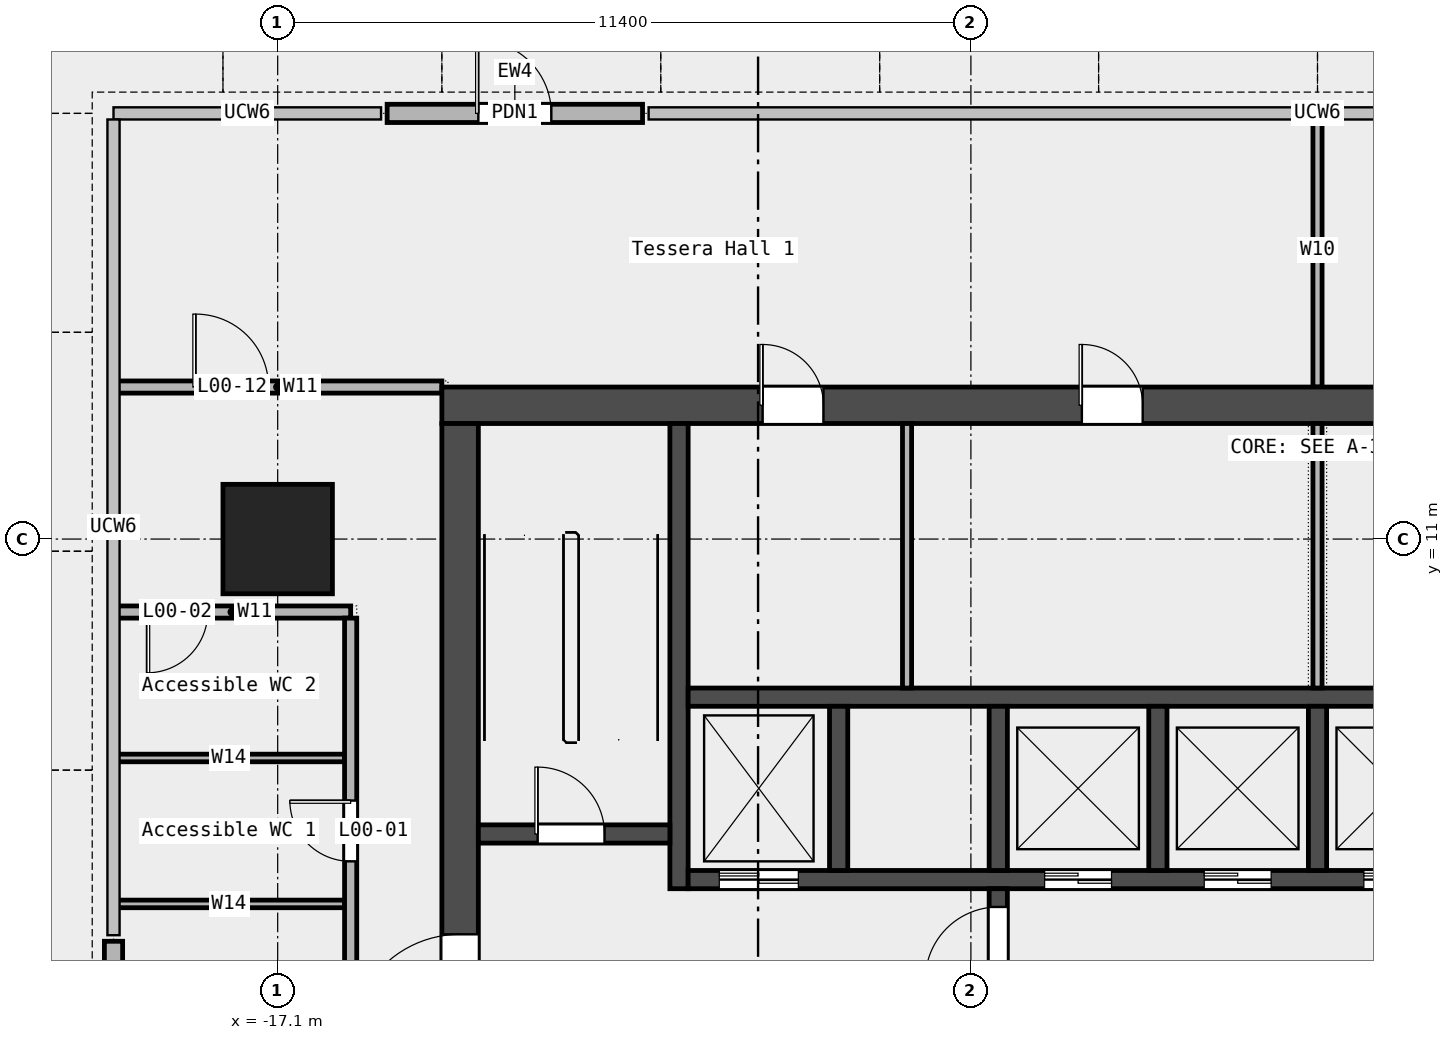
"""IFC4 building model, lengths in metres.
Left out: names, types, materials, properties, quantities, classifications, styles, units other than length and angle.
Written with IfcOpenShell. Run it as: python <this file> out.ifc"""

import sys

from ifc_helpers import new_model, si_unit, direction, frame, frame_2d, origin, origin_2d, place, context, subcontext, project, spatial, rectangle, extrude, element, fill, save


model = new_model("IFC4")
c1 = context("Model", 3, precision=1e-05, world=origin(), true_north=direction((0.0, 1.0)))
c2 = subcontext(c1, "Body", "Model", "MODEL_VIEW")
j1 = project(units=[si_unit("LENGTHUNIT", "METRE"), si_unit("PLANEANGLEUNIT", "RADIAN")], contexts=[c1])
p1 = place(None, origin())
s1 = spatial("IfcSite", under=j1, at=p1, CompositionType="ELEMENT")
p2 = place(p1, origin())
s2 = spatial("IfcBuilding", under=s1, at=p2, CompositionType="ELEMENT")
p3 = place(p2, origin())
s3 = spatial("IfcBuildingStorey", under=s2, at=p3, CompositionType="ELEMENT", Elevation=0.0)
p4 = place(p3, frame((-17.1, 11.0, 0.0), z_axis=(0.0, 0.0, 1.0), x_axis=(1.0, 0.0, 0.0)))
e1 = element("IfcColumn", 1, at=p4, inside=s3, PredefinedType="COLUMN", context=c2, shape_type="SweptSolid", body=[
    extrude(rectangle(XDim=1.8, YDim=1.8, at=origin_2d()), origin(), (0.0, 0.0, 1.0), 7.8),
])
p5 = place(p3, frame((-15.3, 18.0, 0.0), z_axis=(0.0, 0.0, 1.0), x_axis=(1.0, 0.0, 0.0)))
e2 = element("IfcWall", 2, at=p5, inside=s3, PredefinedType="STANDARD", context=c2, shape_type="SweptSolid", body=[
    extrude(rectangle(XDim=4.2, YDim=0.3, at=frame_2d((2.1, 0.0))), origin(), (0.0, 0.0, 1.0), 7.8),
])
p6 = place(p5, frame((1.5, 0.0, 0.0)))
e3 = element("IfcOpeningElement", 3, at=p6, cuts=e2, PredefinedType="OPENING", context=c2, shape_type="SweptSolid", body=[
    extrude(rectangle(XDim=1.2, YDim=2.4, at=frame_2d((0.6, 1.2))), frame((0.0, 0.162, 0.0), z_axis=(0.0, -1.0, 0.0), x_axis=(1.0, 0.0, 0.0)), (0.0, 0.0, 1.0), 0.324),
])
p7 = place(p3, frame((-19.8, 0.114, 0.0), z_axis=(0.0, 0.0, 1.0), x_axis=(0.0, 1.0, 0.0)))
e4 = element("IfcWall", 4, at=p7, inside=s3, PredefinedType="STANDARD", context=c2, shape_type="SweptSolid", body=[
    extrude(rectangle(XDim=4.271, YDim=0.3, at=frame_2d((2.136, 0.0))), origin(), (0.0, 0.0, 1.0), 7.8),
])
p8 = place(p7, frame((1.236, 0.0, 0.0)))
e5 = element("IfcOpeningElement", 5, at=p8, cuts=e4, PredefinedType="OPENING", context=c2, shape_type="SweptSolid", body=[
    extrude(rectangle(XDim=1.8, YDim=2.4, at=frame_2d((0.9, 1.2))), frame((0.0, 0.162, 0.0), z_axis=(0.0, -1.0, 0.0), x_axis=(1.0, 0.0, 0.0)), (0.0, 0.0, 1.0), 0.324),
])
for number, where, z_axis, x_axis in (
    (6, (-19.8, 5.0, 0.0), (0.0, 0.0, 1.0), (1.0, 0.0, 0.0)),
    (7, (-19.8, 7.4, 0.0), (0.0, 0.0, 1.0), (1.0, 0.0, 0.0)),
):
    element("IfcWall", number, at=place(p3, frame(where, z_axis=z_axis, x_axis=x_axis)), inside=s3, PredefinedType="PARTITIONING", context=c2, shape_type="SweptSolid", body=[
        extrude(rectangle(XDim=3.8, YDim=0.125, at=frame_2d((1.9, 0.0))), origin(), (0.0, 0.0, 1.0), 7.8),
    ])
p9 = place(p3, frame((-19.8, 9.8, 0.0), z_axis=(0.0, 0.0, 1.0), x_axis=(1.0, 0.0, 0.0)))
e8 = element("IfcWall", 8, at=p9, inside=s3, PredefinedType="PARTITIONING", context=c2, shape_type="SweptSolid", body=[
    extrude(rectangle(XDim=3.9, YDim=0.2, at=frame_2d((1.95, 0.0))), origin(), (0.0, 0.0, 1.0), 7.8),
])
p10 = place(p9, frame((0.55, 0.0, 0.0)))
e9 = element("IfcOpeningElement", 9, at=p10, cuts=e8, PredefinedType="OPENING", context=c2, shape_type="SweptSolid", body=[
    extrude(rectangle(XDim=1.0, YDim=2.1, at=frame_2d((0.5, 1.05))), frame((0.0, 0.112, 0.0), z_axis=(0.0, -1.0, 0.0), x_axis=(1.0, 0.0, 0.0)), (0.0, 0.0, 1.0), 0.224),
])
p11 = place(p3, frame((-19.8, 13.5, 0.0), z_axis=(0.0, 0.0, 1.0), x_axis=(1.0, 0.0, 0.0)))
e10 = element("IfcWall", 10, at=p11, inside=s3, PredefinedType="PARTITIONING", context=c2, shape_type="SweptSolid", body=[
    extrude(rectangle(XDim=5.4, YDim=0.2, at=frame_2d((2.7, 0.0))), origin(), (0.0, 0.0, 1.0), 7.8),
])
p12 = place(p11, frame((1.35, 0.0, 0.0)))
e11 = element("IfcOpeningElement", 11, at=p12, cuts=e10, PredefinedType="OPENING", context=c2, shape_type="SweptSolid", body=[
    extrude(rectangle(XDim=1.2, YDim=2.1, at=frame_2d((0.6, 1.05))), frame((0.0, 0.112, 0.0), z_axis=(0.0, -1.0, 0.0), x_axis=(1.0, 0.0, 0.0)), (0.0, 0.0, 1.0), 0.224),
])
p13 = place(p3, frame((-15.9, -7.1, 0.0), z_axis=(0.0, 0.0, 1.0), x_axis=(0.0, 1.0, 0.0)))
e12 = element("IfcWall", 12, at=p13, inside=s3, PredefinedType="PARTITIONING", context=c2, shape_type="SweptSolid", body=[
    extrude(rectangle(XDim=16.8, YDim=0.2, at=frame_2d((8.4, 0.0))), origin(), (0.0, 0.0, 1.0), 7.8),
])
p14 = place(p13, frame((12.8, 0.0, 0.0)))
e13 = element("IfcOpeningElement", 13, at=p14, cuts=e12, PredefinedType="OPENING", context=c2, shape_type="SweptSolid", body=[
    extrude(rectangle(XDim=1.0, YDim=2.1, at=frame_2d((0.5, 1.05))), frame((0.0, 0.112, 0.0), z_axis=(0.0, -1.0, 0.0), x_axis=(1.0, 0.0, 0.0)), (0.0, 0.0, 1.0), 0.224),
])
p15 = place(p13, frame((8.55, 0.0, 0.0)))
e14 = element("IfcOpeningElement", 14, at=p15, cuts=e12, PredefinedType="OPENING", context=c2, shape_type="SweptSolid", body=[
    extrude(rectangle(XDim=0.9, YDim=2.1, at=frame_2d((0.45, 1.05))), frame((0.0, 0.112, 0.0), z_axis=(0.0, -1.0, 0.0), x_axis=(1.0, 0.0, 0.0)), (0.0, 0.0, 1.0), 0.224),
])
p16 = place(p13, frame((2.5, 0.0, 0.0)))
e15 = element("IfcOpeningElement", 15, at=p16, cuts=e12, PredefinedType="OPENING", context=c2, shape_type="SweptSolid", body=[
    extrude(rectangle(XDim=0.9, YDim=2.1, at=frame_2d((0.45, 1.05))), frame((0.0, 0.112, 0.0), z_axis=(0.0, -1.0, 0.0), x_axis=(1.0, 0.0, 0.0)), (0.0, 0.0, 1.0), 0.224),
])
p17 = place(p3, frame((0.0, 13.5, 0.0), z_axis=(0.0, 0.0, 1.0), x_axis=(0.0, 1.0, 0.0)))
e16 = element("IfcWall", 16, at=p17, inside=s3, PredefinedType="PARTITIONING", context=c2, shape_type="SweptSolid", body=[
    extrude(rectangle(XDim=4.5, YDim=0.15, at=frame_2d((2.25, 0.0))), origin(), (0.0, 0.0, 1.0), 7.8),
])
p18 = place(p3, frame((-14.4, 13.2, 0.0), z_axis=(0.0, 0.0, 1.0), x_axis=(1.0, 0.0, 0.0)))
e17 = element("IfcWall", 17, at=p18, inside=s3, PredefinedType="SHEAR", context=c2, shape_type="SweptSolid", body=[
    extrude(rectangle(XDim=28.8, YDim=0.6, at=frame_2d((14.4, 0.0))), origin(), (0.0, 0.0, 1.0), 8.7),
])
p19 = place(p18, frame((5.275, 0.0, 0.0)))
e18 = element("IfcOpeningElement", 18, at=p19, cuts=e17, PredefinedType="OPENING", context=c2, shape_type="SweptSolid", body=[
    extrude(rectangle(XDim=1.0, YDim=2.1, at=frame_2d((0.5, 1.05))), frame((0.0, 0.312, 0.0), z_axis=(0.0, -1.0, 0.0), x_axis=(1.0, 0.0, 0.0)), (0.0, 0.0, 1.0), 0.624),
])
p20 = place(p18, frame((10.525, 0.0, 0.0)))
e19 = element("IfcOpeningElement", 19, at=p20, cuts=e17, PredefinedType="OPENING", context=c2, shape_type="SweptSolid", body=[
    extrude(rectangle(XDim=1.0, YDim=2.1, at=frame_2d((0.5, 1.05))), frame((0.0, 0.312, 0.0), z_axis=(0.0, -1.0, 0.0), x_axis=(1.0, 0.0, 0.0)), (0.0, 0.0, 1.0), 0.624),
])
p21 = place(p18, frame((15.4, 0.0, 0.0)))
e20 = element("IfcOpeningElement", 20, at=p21, cuts=e17, PredefinedType="OPENING", context=c2, shape_type="SweptSolid", body=[
    extrude(rectangle(XDim=1.0, YDim=2.1, at=frame_2d((0.5, 1.05))), frame((0.0, 0.312, 0.0), z_axis=(0.0, -1.0, 0.0), x_axis=(1.0, 0.0, 0.0)), (0.0, 0.0, 1.0), 0.624),
])
p22 = place(p18, frame((18.775, 0.0, 0.0)))
e21 = element("IfcOpeningElement", 21, at=p22, cuts=e17, PredefinedType="OPENING", context=c2, shape_type="SweptSolid", body=[
    extrude(rectangle(XDim=1.0, YDim=2.1, at=frame_2d((0.5, 1.05))), frame((0.0, 0.312, 0.0), z_axis=(0.0, -1.0, 0.0), x_axis=(1.0, 0.0, 0.0)), (0.0, 0.0, 1.0), 0.624),
])
p23 = place(p18, frame((22.525, 0.0, 0.0)))
e22 = element("IfcOpeningElement", 22, at=p23, cuts=e17, PredefinedType="OPENING", context=c2, shape_type="SweptSolid", body=[
    extrude(rectangle(XDim=1.0, YDim=2.1, at=frame_2d((0.5, 1.05))), frame((0.0, 0.312, 0.0), z_axis=(0.0, -1.0, 0.0), x_axis=(1.0, 0.0, 0.0)), (0.0, 0.0, 1.0), 0.624),
])
p24 = place(p3, frame((-14.1, -6.6, 0.0), z_axis=(0.0, 0.0, 1.0), x_axis=(0.0, 1.0, 0.0)))
e23 = element("IfcWall", 23, at=p24, inside=s3, PredefinedType="SHEAR", context=c2, shape_type="SweptSolid", body=[
    extrude(rectangle(XDim=19.5, YDim=0.6, at=frame_2d((9.75, 0.0))), origin(), (0.0, 0.0, 1.0), 8.7),
])
p25 = place(p24, frame((9.3, 0.0, 0.0)))
e24 = element("IfcOpeningElement", 24, at=p25, cuts=e23, PredefinedType="OPENING", context=c2, shape_type="SweptSolid", body=[
    extrude(rectangle(XDim=1.8, YDim=2.1, at=frame_2d((0.9, 1.05))), frame((0.0, 0.312, 0.0), z_axis=(0.0, -1.0, 0.0), x_axis=(1.0, 0.0, 0.0)), (0.0, 0.0, 1.0), 0.624),
])
p26 = place(p3, frame((-10.5, 5.25, 0.0), z_axis=(0.0, 0.0, 1.0), x_axis=(0.0, 1.0, 0.0)))
e25 = element("IfcWall", 25, at=p26, inside=s3, PredefinedType="SHEAR", context=c2, shape_type="SweptSolid", body=[
    extrude(rectangle(XDim=7.65, YDim=0.3, at=frame_2d((3.825, 0.0))), origin(), (0.0, 0.0, 1.0), 8.7),
])
p27 = place(p3, frame((-13.8, 6.15, 0.0), z_axis=(0.0, 0.0, 1.0), x_axis=(1.0, 0.0, 0.0)))
e26 = element("IfcWall", 26, at=p27, inside=s3, PredefinedType="SOLIDWALL", context=c2, shape_type="SweptSolid", body=[
    extrude(rectangle(XDim=3.15, YDim=0.3, at=frame_2d((1.575, 0.0))), origin(), (0.0, 0.0, 1.0), 8.7),
])
p28 = place(p27, frame((0.975, 0.0, 0.0)))
e27 = element("IfcOpeningElement", 27, at=p28, cuts=e26, PredefinedType="OPENING", context=c2, shape_type="SweptSolid", body=[
    extrude(rectangle(XDim=1.1, YDim=2.1, at=frame_2d((0.55, 1.05))), frame((0.0, 0.162, 0.0), z_axis=(0.0, -1.0, 0.0), x_axis=(1.0, 0.0, 0.0)), (0.0, 0.0, 1.0), 0.324),
])
p29 = place(p3, frame((-10.35, 5.4, -1.8), z_axis=(0.0, 0.0, 1.0), x_axis=(1.0, 0.0, 0.0)))
e28 = element("IfcWall", 28, at=p29, inside=s3, PredefinedType="SOLIDWALL", context=c2, shape_type="SweptSolid", body=[
    extrude(rectangle(XDim=20.7, YDim=0.3, at=frame_2d((10.35, 0.0))), origin(), (0.0, 0.0, 1.0), 10.5),
])
p30 = place(p29, frame((0.512, 0.0, 1.8)))
e29 = element("IfcOpeningElement", 29, at=p30, cuts=e28, PredefinedType="OPENING", context=c2, shape_type="SweptSolid", body=[
    extrude(rectangle(XDim=1.3, YDim=2.1, at=frame_2d((0.65, 1.05))), frame((0.0, 0.162, 0.0), z_axis=(0.0, -1.0, 0.0), x_axis=(1.0, 0.0, 0.0)), (0.0, 0.0, 1.0), 0.324),
])
p31 = place(p29, frame((5.863, 0.0, 1.8)))
e30 = element("IfcOpeningElement", 30, at=p31, cuts=e28, PredefinedType="OPENING", context=c2, shape_type="SweptSolid", body=[
    extrude(rectangle(XDim=1.1, YDim=2.1, at=frame_2d((0.55, 1.05))), frame((0.0, 0.162, 0.0), z_axis=(0.0, -1.0, 0.0), x_axis=(1.0, 0.0, 0.0)), (0.0, 0.0, 1.0), 0.324),
])
p32 = place(p29, frame((8.488, 0.0, 1.8)))
e31 = element("IfcOpeningElement", 31, at=p32, cuts=e28, PredefinedType="OPENING", context=c2, shape_type="SweptSolid", body=[
    extrude(rectangle(XDim=1.1, YDim=2.1, at=frame_2d((0.55, 1.05))), frame((0.0, 0.162, 0.0), z_axis=(0.0, -1.0, 0.0), x_axis=(1.0, 0.0, 0.0)), (0.0, 0.0, 1.0), 0.324),
])
p33 = place(p29, frame((11.113, 0.0, 1.8)))
e32 = element("IfcOpeningElement", 32, at=p33, cuts=e28, PredefinedType="OPENING", context=c2, shape_type="SweptSolid", body=[
    extrude(rectangle(XDim=1.1, YDim=2.1, at=frame_2d((0.55, 1.05))), frame((0.0, 0.162, 0.0), z_axis=(0.0, -1.0, 0.0), x_axis=(1.0, 0.0, 0.0)), (0.0, 0.0, 1.0), 0.324),
])
p34 = place(p29, frame((13.738, 0.0, 1.8)))
e33 = element("IfcOpeningElement", 33, at=p34, cuts=e28, PredefinedType="OPENING", context=c2, shape_type="SweptSolid", body=[
    extrude(rectangle(XDim=1.1, YDim=2.1, at=frame_2d((0.55, 1.05))), frame((0.0, 0.162, 0.0), z_axis=(0.0, -1.0, 0.0), x_axis=(1.0, 0.0, 0.0)), (0.0, 0.0, 1.0), 0.324),
])
p35 = place(p29, frame((16.363, 0.0, 1.8)))
e34 = element("IfcOpeningElement", 34, at=p35, cuts=e28, PredefinedType="OPENING", context=c2, shape_type="SweptSolid", body=[
    extrude(rectangle(XDim=1.1, YDim=2.1, at=frame_2d((0.55, 1.05))), frame((0.0, 0.162, 0.0), z_axis=(0.0, -1.0, 0.0), x_axis=(1.0, 0.0, 0.0)), (0.0, 0.0, 1.0), 0.324),
])
p36 = place(p29, frame((18.988, 0.0, 1.8)))
e35 = element("IfcOpeningElement", 35, at=p36, cuts=e28, PredefinedType="OPENING", context=c2, shape_type="SweptSolid", body=[
    extrude(rectangle(XDim=1.1, YDim=2.1, at=frame_2d((0.55, 1.05))), frame((0.0, 0.162, 0.0), z_axis=(0.0, -1.0, 0.0), x_axis=(1.0, 0.0, 0.0)), (0.0, 0.0, 1.0), 0.324),
])
p37 = place(p3, frame((-10.35, 8.4, -1.8), z_axis=(0.0, 0.0, 1.0), x_axis=(1.0, 0.0, 0.0)))
e36 = element("IfcWall", 36, at=p37, inside=s3, PredefinedType="SOLIDWALL", context=c2, shape_type="SweptSolid", body=[
    extrude(rectangle(XDim=20.7, YDim=0.3, at=frame_2d((10.35, 0.0))), origin(), (0.0, 0.0, 1.0), 10.5),
])
for number, where, z_axis, x_axis in (
    (37, (-7.875, 5.55, -1.8), (0.0, 0.0, 1.0), (0.0, 1.0, 0.0)),
    (38, (-5.25, 5.55, -1.8), (0.0, 0.0, 1.0), (0.0, 1.0, 0.0)),
    (39, (-2.625, 5.55, -1.8), (0.0, 0.0, 1.0), (0.0, 1.0, 0.0)),
    (40, (0.0, 5.55, -1.8), (0.0, 0.0, 1.0), (0.0, 1.0, 0.0)),
):
    element("IfcWall", number, at=place(p3, frame(where, z_axis=z_axis, x_axis=x_axis)), inside=s3, PredefinedType="SOLIDWALL", context=c2, shape_type="SweptSolid", body=[
        extrude(rectangle(XDim=2.7, YDim=0.3, at=frame_2d((1.35, 0.0))), origin(), (0.0, 0.0, 1.0), 10.5),
    ])
p38 = place(p3, frame((-5.25, 1.95, 0.0), z_axis=(0.0, 0.0, 1.0), x_axis=(0.0, 1.0, 0.0)))
e41 = element("IfcWall", 41, at=p38, inside=s3, PredefinedType="SOLIDWALL", context=c2, shape_type="SweptSolid", body=[
    extrude(rectangle(XDim=3.3, YDim=0.3, at=frame_2d((1.65, 0.0))), origin(), (0.0, 0.0, 1.0), 8.7),
])
p39 = place(p38, frame((0.3, 0.0, 0.0)))
e42 = element("IfcOpeningElement", 42, at=p39, cuts=e41, PredefinedType="OPENING", context=c2, shape_type="SweptSolid", body=[
    extrude(rectangle(XDim=1.2, YDim=2.1, at=frame_2d((0.6, 1.05))), frame((0.0, 0.162, 0.0), z_axis=(0.0, -1.0, 0.0), x_axis=(1.0, 0.0, 0.0)), (0.0, 0.0, 1.0), 0.324),
])
p40 = place(p38, frame((1.8, 0.0, 0.0)))
e43 = element("IfcOpeningElement", 43, at=p40, cuts=e41, PredefinedType="OPENING", context=c2, shape_type="SweptSolid", body=[
    extrude(rectangle(XDim=1.2, YDim=2.1, at=frame_2d((0.6, 1.05))), frame((0.0, 0.162, 0.0), z_axis=(0.0, -1.0, 0.0), x_axis=(1.0, 0.0, 0.0)), (0.0, 0.0, 1.0), 0.324),
])
for number, where, z_axis, x_axis in (
    (44, (-6.75, 8.55, 0.0), (0.0, 0.0, 1.0), (0.0, 1.0, 0.0)),
    (45, (0.0, 8.55, 0.0), (0.0, 0.0, 1.0), (0.0, 1.0, 0.0)),
):
    element("IfcWall", number, at=place(p3, frame(where, z_axis=z_axis, x_axis=x_axis)), inside=s3, PredefinedType="PARTITIONING", context=c2, shape_type="SweptSolid", body=[
        extrude(rectangle(XDim=4.35, YDim=0.15, at=frame_2d((2.175, 0.0))), origin(), (0.0, 0.0, 1.0), 8.7),
    ])
p41 = place(p6, origin())
e46 = element("IfcDoor", 46, at=p41, inside=s3, OperationType="SINGLE_SWING_LEFT", PredefinedType="DOOR", context=c2, shape_type="SweptSolid", body=[
    extrude(rectangle(XDim=1.2, YDim=2.4, at=frame_2d((0.6, 1.2))), frame((0.0, 0.025, 0.0), z_axis=(0.0, -1.0, 0.0), x_axis=(1.0, 0.0, 0.0)), (0.0, 0.0, 1.0), 0.05),
])
fill(e3, e46)
p42 = place(p14, origin())
e47 = element("IfcDoor", 47, at=p42, inside=s3, OperationType="SINGLE_SWING_RIGHT", PredefinedType="DOOR", context=c2, shape_type="SweptSolid", body=[
    extrude(rectangle(XDim=1.0, YDim=2.1, at=frame_2d((0.5, 1.05))), frame((0.0, 0.025, 0.0), z_axis=(0.0, -1.0, 0.0), x_axis=(1.0, 0.0, 0.0)), (0.0, 0.0, 1.0), 0.05),
])
fill(e13, e47)
p43 = place(p10, origin())
e48 = element("IfcDoor", 48, at=p43, inside=s3, OperationType="SINGLE_SWING_RIGHT", PredefinedType="DOOR", context=c2, shape_type="SweptSolid", body=[
    extrude(rectangle(XDim=1.0, YDim=2.1, at=frame_2d((0.5, 1.05))), frame((0.0, 0.025, 0.0), z_axis=(0.0, -1.0, 0.0), x_axis=(1.0, 0.0, 0.0)), (0.0, 0.0, 1.0), 0.05),
])
fill(e9, e48)
p44 = place(p12, origin())
e49 = element("IfcDoor", 49, at=p44, inside=s3, OperationType="SINGLE_SWING_LEFT", PredefinedType="DOOR", context=c2, shape_type="SweptSolid", body=[
    extrude(rectangle(XDim=1.2, YDim=2.1, at=frame_2d((0.6, 1.05))), frame((0.0, 0.025, 0.0), z_axis=(0.0, -1.0, 0.0), x_axis=(1.0, 0.0, 0.0)), (0.0, 0.0, 1.0), 0.05),
])
fill(e11, e49)
p45 = place(p28, origin())
e50 = element("IfcDoor", 50, at=p45, inside=s3, OperationType="SINGLE_SWING_LEFT", PredefinedType="DOOR", context=c2, shape_type="SweptSolid", body=[
    extrude(rectangle(XDim=1.1, YDim=2.1, at=frame_2d((0.55, 1.05))), frame((0.0, 0.025, 0.0), z_axis=(0.0, -1.0, 0.0), x_axis=(1.0, 0.0, 0.0)), (0.0, 0.0, 1.0), 0.05),
])
fill(e27, e50)
p46 = place(p25, origin())
e51 = element("IfcDoor", 51, at=p46, inside=s3, OperationType="DOUBLE_DOOR_SINGLE_SWING", PredefinedType="DOOR", context=c2, shape_type="SweptSolid", body=[
    extrude(rectangle(XDim=1.8, YDim=2.1, at=frame_2d((0.9, 1.05))), frame((0.0, 0.025, 0.0), z_axis=(0.0, -1.0, 0.0), x_axis=(1.0, 0.0, 0.0)), (0.0, 0.0, 1.0), 0.05),
])
fill(e24, e51)
p47 = place(p40, origin())
e52 = element("IfcDoor", 52, at=p47, inside=s3, OperationType="SINGLE_SWING_RIGHT", PredefinedType="DOOR", context=c2, shape_type="SweptSolid", body=[
    extrude(rectangle(XDim=1.2, YDim=2.1, at=frame_2d((0.6, 1.05))), frame((0.0, 0.025, 0.0), z_axis=(0.0, -1.0, 0.0), x_axis=(1.0, 0.0, 0.0)), (0.0, 0.0, 1.0), 0.05),
])
fill(e43, e52)
p48 = place(p30, origin())
e53 = element("IfcDoor", 53, at=p48, inside=s3, OperationType="DOUBLE_DOOR_SLIDING", PredefinedType="DOOR", context=c2, shape_type="SweptSolid", body=[
    extrude(rectangle(XDim=1.3, YDim=2.1, at=frame_2d((0.65, 1.05))), frame((0.0, 0.025, 0.0), z_axis=(0.0, -1.0, 0.0), x_axis=(1.0, 0.0, 0.0)), (0.0, 0.0, 1.0), 0.05),
])
fill(e29, e53)
p49 = place(p31, origin())
e54 = element("IfcDoor", 54, at=p49, inside=s3, OperationType="DOUBLE_DOOR_SLIDING", PredefinedType="DOOR", context=c2, shape_type="SweptSolid", body=[
    extrude(rectangle(XDim=1.1, YDim=2.1, at=frame_2d((0.55, 1.05))), frame((0.0, 0.025, 0.0), z_axis=(0.0, -1.0, 0.0), x_axis=(1.0, 0.0, 0.0)), (0.0, 0.0, 1.0), 0.05),
])
fill(e30, e54)
p50 = place(p32, origin())
e55 = element("IfcDoor", 55, at=p50, inside=s3, OperationType="DOUBLE_DOOR_SLIDING", PredefinedType="DOOR", context=c2, shape_type="SweptSolid", body=[
    extrude(rectangle(XDim=1.1, YDim=2.1, at=frame_2d((0.55, 1.05))), frame((0.0, 0.025, 0.0), z_axis=(0.0, -1.0, 0.0), x_axis=(1.0, 0.0, 0.0)), (0.0, 0.0, 1.0), 0.05),
])
fill(e31, e55)
p51 = place(p33, origin())
e56 = element("IfcDoor", 56, at=p51, inside=s3, OperationType="DOUBLE_DOOR_SLIDING", PredefinedType="DOOR", context=c2, shape_type="SweptSolid", body=[
    extrude(rectangle(XDim=1.1, YDim=2.1, at=frame_2d((0.55, 1.05))), frame((0.0, 0.025, 0.0), z_axis=(0.0, -1.0, 0.0), x_axis=(1.0, 0.0, 0.0)), (0.0, 0.0, 1.0), 0.05),
])
fill(e32, e56)
p52 = place(p19, origin())
e57 = element("IfcDoor", 57, at=p52, inside=s3, OperationType="SINGLE_SWING_LEFT", PredefinedType="DOOR", context=c2, shape_type="SweptSolid", body=[
    extrude(rectangle(XDim=1.0, YDim=2.1, at=frame_2d((0.5, 1.05))), frame((0.0, 0.025, 0.0), z_axis=(0.0, -1.0, 0.0), x_axis=(1.0, 0.0, 0.0)), (0.0, 0.0, 1.0), 0.05),
])
fill(e18, e57)
p53 = place(p20, origin())
e58 = element("IfcDoor", 58, at=p53, inside=s3, OperationType="SINGLE_SWING_LEFT", PredefinedType="DOOR", context=c2, shape_type="SweptSolid", body=[
    extrude(rectangle(XDim=1.0, YDim=2.1, at=frame_2d((0.5, 1.05))), frame((0.0, 0.025, 0.0), z_axis=(0.0, -1.0, 0.0), x_axis=(1.0, 0.0, 0.0)), (0.0, 0.0, 1.0), 0.05),
])
fill(e19, e58)
save(model, sys.argv[1])
